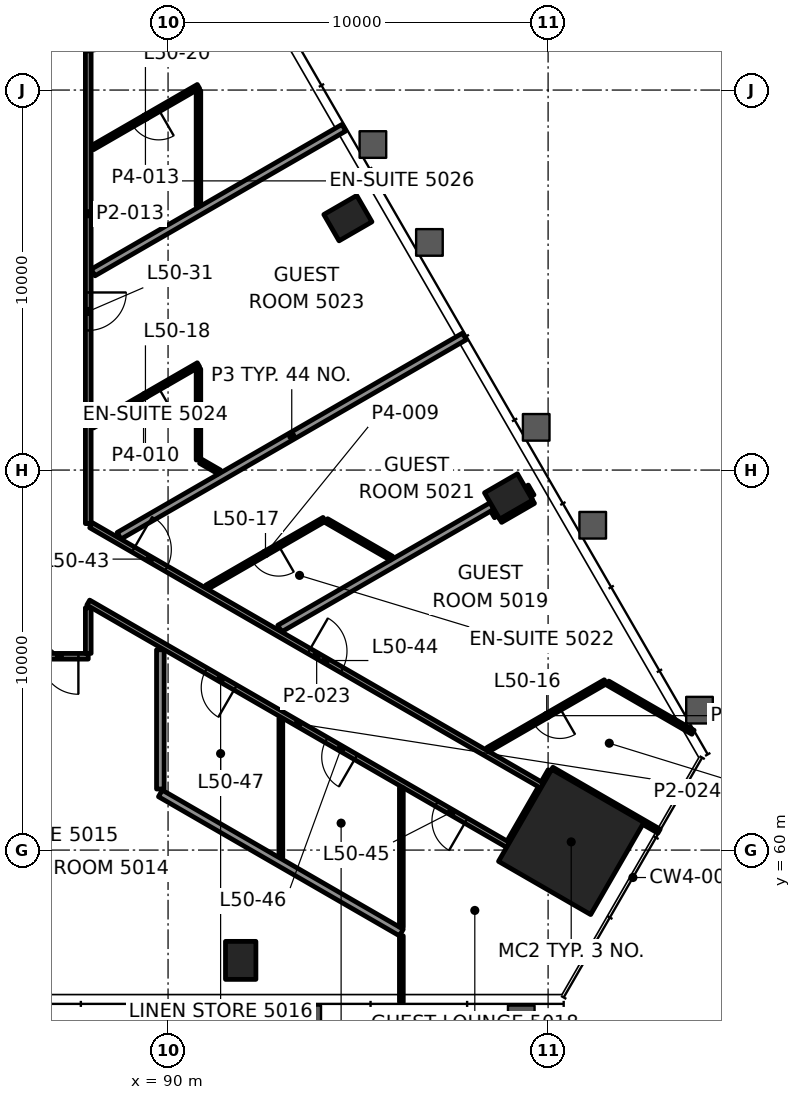
"""IFC4 building model, lengths in metres.
Left out: names, types, materials, properties, quantities, classifications, styles, units other than length and angle.
Written with IfcOpenShell. Run it as: python <this file> out.ifc"""

import sys

from ifc_helpers import new_model, si_unit, direction, frame, frame_2d, origin, origin_2d, place, context, subcontext, project, spatial, rectangle, hollow_rectangle, extrude, element, fill, save


model = new_model("IFC4")
c1 = context("Model", 3, precision=1e-05, world=origin(), true_north=direction((0.0, 1.0)))
c2 = subcontext(c1, "Body", "Model", "MODEL_VIEW")
j1 = project(units=[si_unit("LENGTHUNIT", "METRE"), si_unit("PLANEANGLEUNIT", "RADIAN")], contexts=[c1])
p1 = place(None, origin())
s1 = spatial("IfcSite", under=j1, at=p1, CompositionType="ELEMENT")
p2 = place(p1, origin())
s2 = spatial("IfcBuilding", under=s1, at=p2, CompositionType="ELEMENT")
p3 = place(p2, frame((0.0, 0.0, 214.3)))
s3 = spatial("IfcBuildingStorey", under=s2, at=p3, CompositionType="ELEMENT", Elevation=214.3)
p4 = place(p3, frame((100.608, 60.215, 0.0), z_axis=(0.0, 0.0, 1.0), x_axis=(0.5, 0.866025403784, 0.0)))
e1 = element("IfcColumn", 1, at=p4, inside=s3, PredefinedType="COLUMN", context=c2, shape_type="SweptSolid", body=[
    extrude(rectangle(XDim=2.8, YDim=2.8, at=origin_2d()), origin(), (0.0, 0.0, 1.0), 3.9),
])
for number, where, z_axis, x_axis in (
    (2, (91.911, 57.097, -0.0), (0.0, 0.0, 1.0), (1.0, 0.0, 0.0)),
    (3, (98.96, 69.306, -0.0), (0.0, 0.0, 1.0), (-0.5, 0.866, 0.0)),
    (4, (94.732, 76.628, -0.0), (0.0, 0.0, 1.0), (-0.5, 0.866, 0.0)),
):
    element("IfcColumn", number, at=place(p3, frame(where, z_axis=z_axis, x_axis=x_axis)), inside=s3, PredefinedType="COLUMN", context=c2, shape_type="SweptSolid", body=[
        extrude(hollow_rectangle(XDim=0.8, YDim=1.0, WallThickness=0.05, at=origin_2d()), origin(), (0.0, 0.0, 1.0), 3.9),
    ])
p5 = place(p3, frame((87.899, 65.1, 0.0), z_axis=(0.0, 0.0, 1.0), x_axis=(-1.0, 0.0, 0.0)))
e5 = element("IfcWall", 5, at=p5, inside=s3, PredefinedType="PARTITIONING", context=c2, shape_type="SweptSolid", body=[
    extrude(rectangle(XDim=25.799, YDim=0.15, at=frame_2d((12.899, 0.0))), origin(), (0.0, 0.0, 1.0), 3.1),
])
p6 = place(p5, frame((0.259, 0.0, 0.0)))
e6 = element("IfcOpeningElement", 6, at=p6, cuts=e5, PredefinedType="OPENING", context=c2, shape_type="SweptSolid", body=[
    extrude(rectangle(XDim=1.0, YDim=2.1, at=frame_2d((0.5, 1.05))), frame((0.0, 0.085, 0.0), z_axis=(0.0, -1.0, 0.0), x_axis=(1.0, 0.0, 0.0)), (0.0, 0.0, 1.0), 0.17),
])
p7 = place(p5, frame((4.641, 0.0, 0.0)))
e7 = element("IfcOpeningElement", 7, at=p7, cuts=e5, PredefinedType="OPENING", context=c2, shape_type="SweptSolid", body=[
    extrude(rectangle(XDim=1.0, YDim=2.1, at=frame_2d((0.5, 1.05))), frame((0.0, 0.085, 0.0), z_axis=(0.0, -1.0, 0.0), x_axis=(1.0, 0.0, 0.0)), (0.0, 0.0, 1.0), 0.17),
])
p8 = place(p5, frame((8.868, 0.0, 0.0)))
e8 = element("IfcOpeningElement", 8, at=p8, cuts=e5, PredefinedType="OPENING", context=c2, shape_type="SweptSolid", body=[
    extrude(rectangle(XDim=1.0, YDim=2.1, at=frame_2d((0.5, 1.05))), frame((0.0, 0.085, 0.0), z_axis=(0.0, -1.0, 0.0), x_axis=(1.0, 0.0, 0.0)), (0.0, 0.0, 1.0), 0.17),
])
p9 = place(p5, frame((13.271, 0.0, 0.0)))
e9 = element("IfcOpeningElement", 9, at=p9, cuts=e5, PredefinedType="OPENING", context=c2, shape_type="SweptSolid", body=[
    extrude(rectangle(XDim=1.0, YDim=2.1, at=frame_2d((0.5, 1.05))), frame((0.0, 0.085, 0.0), z_axis=(0.0, -1.0, 0.0), x_axis=(1.0, 0.0, 0.0)), (0.0, 0.0, 1.0), 0.17),
])
p10 = place(p5, frame((19.612, 0.0, 0.0)))
e10 = element("IfcOpeningElement", 10, at=p10, cuts=e5, PredefinedType="OPENING", context=c2, shape_type="SweptSolid", body=[
    extrude(rectangle(XDim=1.0, YDim=2.1, at=frame_2d((0.5, 1.05))), frame((0.0, 0.085, 0.0), z_axis=(0.0, -1.0, 0.0), x_axis=(1.0, 0.0, 0.0)), (0.0, 0.0, 1.0), 0.17),
])
p11 = place(p3, frame((101.509, 64.429, 0.0), z_axis=(0.0, 0.0, 1.0), x_axis=(-0.866028357664, -0.499994883695, 0.0)))
e11 = element("IfcWall", 11, at=p11, inside=s3, PredefinedType="PARTITIONING", context=c2, shape_type="SweptSolid", body=[
    extrude(rectangle(XDim=3.568, YDim=0.12, at=frame_2d((1.784, 0.0))), origin(), (0.0, 0.0, 1.0), 3.1),
])
p12 = place(p11, frame((1.384, 0.0, 0.0)))
e12 = element("IfcOpeningElement", 12, at=p12, cuts=e11, PredefinedType="OPENING", context=c2, shape_type="SweptSolid", body=[
    extrude(rectangle(XDim=0.8, YDim=2.1, at=frame_2d((0.4, 1.05))), frame((0.0, 0.07, 0.0), z_axis=(0.0, -1.0, 0.0), x_axis=(1.0, 0.0, 0.0)), (0.0, 0.0, 1.0), 0.14),
])
p13 = place(p3, frame((98.727, 68.71, 0.0), z_axis=(0.0, 0.0, 1.0), x_axis=(0.866083827272, 0.499898793895, 0.0)))
e13 = element("IfcWall", 13, at=p13, inside=s3, PredefinedType="PARTITIONING", context=c2, shape_type="SweptSolid", body=[
    extrude(rectangle(XDim=0.999, YDim=0.2, at=frame_2d((0.5, 0.0))), origin(), (0.0, 0.0, 1.0), 3.1),
])
p14 = place(p3, frame((92.938, 65.83, 0.0), z_axis=(0.0, 0.0, 1.0), x_axis=(0.866041300655, 0.499972464802, 0.0)))
e14 = element("IfcWall", 14, at=p14, inside=s3, PredefinedType="PARTITIONING", context=c2, shape_type="SweptSolid", body=[
    extrude(rectangle(XDim=6.452, YDim=0.2, at=frame_2d((3.226, 0.0))), origin(), (0.0, 0.0, 1.0), 3.1),
])
p15 = place(p3, frame((94.109, 68.702, 0.0), z_axis=(0.0, 0.0, 1.0), x_axis=(-0.866028357664, -0.499994883695, 0.0)))
e15 = element("IfcWall", 15, at=p15, inside=s3, PredefinedType="PARTITIONING", context=c2, shape_type="SweptSolid", body=[
    extrude(rectangle(XDim=3.568, YDim=0.12, at=frame_2d((1.784, 0.0))), origin(), (0.0, 0.0, 1.0), 3.1),
])
p16 = place(p15, frame((1.384, 0.0, 0.0)))
e16 = element("IfcOpeningElement", 16, at=p16, cuts=e15, PredefinedType="OPENING", context=c2, shape_type="SweptSolid", body=[
    extrude(rectangle(XDim=0.8, YDim=2.1, at=frame_2d((0.4, 1.05))), frame((0.0, 0.07, 0.0), z_axis=(0.0, -1.0, 0.0), x_axis=(1.0, 0.0, 0.0)), (0.0, 0.0, 1.0), 0.14),
])
p17 = place(p3, frame((88.711, 68.27, 0.0), z_axis=(0.0, 0.0, 1.0), x_axis=(0.86602828922, 0.499995002246, 0.0)))
e17 = element("IfcWall", 17, at=p17, inside=s3, PredefinedType="PARTITIONING", context=c2, shape_type="SweptSolid", body=[
    extrude(rectangle(XDim=10.494, YDim=0.2, at=frame_2d((5.247, 0.0))), origin(), (0.0, 0.0, 1.0), 3.022),
])
p18 = place(p3, frame((90.8, 72.771, 0.0), z_axis=(0.0, 0.0, 1.0), x_axis=(-0.86604299788, -0.499969524894, 0.0)))
e18 = element("IfcWall", 18, at=p18, inside=s3, PredefinedType="PARTITIONING", context=c2, shape_type="SweptSolid", body=[
    extrude(rectangle(XDim=3.222, YDim=0.12, at=frame_2d((1.611, 0.0))), origin(), (0.0, 0.0, 1.0), 3.1),
])
p19 = place(p18, frame((1.211, 0.0, 0.0)))
e19 = element("IfcOpeningElement", 19, at=p19, cuts=e18, PredefinedType="OPENING", context=c2, shape_type="SweptSolid", body=[
    extrude(rectangle(XDim=0.8, YDim=2.1, at=frame_2d((0.4, 1.05))), frame((0.0, 0.07, 0.0), z_axis=(0.0, -1.0, 0.0), x_axis=(1.0, 0.0, 0.0)), (0.0, 0.0, 1.0), 0.14),
])
p20 = place(p3, frame((88.027, 75.198, 0.0), z_axis=(0.0, 0.0, 1.0), x_axis=(0.866028758719, 0.499994189038, 0.0)))
e20 = element("IfcWall", 20, at=p20, inside=s3, PredefinedType="PARTITIONING", context=c2, shape_type="SweptSolid", body=[
    extrude(rectangle(XDim=7.622, YDim=0.2, at=frame_2d((3.811, 0.0))), origin(), (0.0, 0.0, 1.0), 3.022),
])
p21 = place(p3, frame((90.8, 80.095, 0.0), z_axis=(0.0, 0.0, 1.0), x_axis=(-0.866029130051, -0.499993545862, 0.0)))
e21 = element("IfcWall", 21, at=p21, inside=s3, PredefinedType="PARTITIONING", context=c2, shape_type="SweptSolid", body=[
    extrude(rectangle(XDim=3.222, YDim=0.12, at=frame_2d((1.611, 0.0))), origin(), (0.0, 0.0, 1.0), 3.1),
])
p22 = place(p21, frame((1.211, 0.0, 0.0)))
e22 = element("IfcOpeningElement", 22, at=p22, cuts=e21, PredefinedType="OPENING", context=c2, shape_type="SweptSolid", body=[
    extrude(rectangle(XDim=0.8, YDim=2.1, at=frame_2d((0.4, 1.05))), frame((0.0, 0.07, 0.0), z_axis=(0.0, -1.0, 0.0), x_axis=(1.0, 0.0, 0.0)), (0.0, 0.0, 1.0), 0.14),
])
p23 = place(p3, frame((98.984, 60.201, 0.0), z_axis=(0.0, 0.0, 1.0), x_axis=(0.499991515992, 0.866030301974, 0.0)))
e23 = element("IfcWall", 23, at=p23, inside=s3, PredefinedType="PARTITIONING", context=c2, shape_type="SweptSolid", body=[
    extrude(rectangle(XDim=1.649, YDim=0.15, at=frame_2d((0.825, 0.0))), origin(), (0.0, 0.0, 1.0), 2.947),
])
p24 = place(p3, frame((96.139, 55.998, 0.0), z_axis=(0.0, 0.0, 1.0), x_axis=(0.0, 1.0, 0.0)))
e24 = element("IfcWall", 24, at=p24, inside=s3, PredefinedType="PARTITIONING", context=c2, shape_type="SweptSolid", body=[
    extrude(rectangle(XDim=1.746, YDim=0.1, at=frame_2d((0.873, 0.0))), origin(), (0.0, 0.0, 1.0), 3.1),
])
p25 = place(p3, frame((92.968, 59.806, 0.0), z_axis=(0.0, 0.0, 1.0), x_axis=(0.0, 1.0, 0.0)))
e25 = element("IfcWall", 25, at=p25, inside=s3, PredefinedType="PARTITIONING", context=c2, shape_type="SweptSolid", body=[
    extrude(rectangle(XDim=3.664, YDim=0.1, at=frame_2d((1.832, 0.0))), origin(), (0.0, 0.0, 1.0), 3.1),
])
p26 = place(p3, frame((90.8, 70.266, 0.0), z_axis=(0.0, 0.0, 1.0), x_axis=(0.0, 1.0, 0.0)))
e26 = element("IfcWall", 26, at=p26, inside=s3, PredefinedType="PARTITIONING", context=c2, shape_type="SweptSolid", body=[
    extrude(rectangle(XDim=2.397, YDim=0.12, at=frame_2d((1.198, 0.0))), origin(), (0.0, 0.0, 1.0), 3.1),
])
p27 = place(p3, frame((90.8, 76.955, 0.0), z_axis=(0.0, 0.0, 1.0), x_axis=(0.0, 1.0, 0.0)))
e27 = element("IfcWall", 27, at=p27, inside=s3, PredefinedType="PARTITIONING", context=c2, shape_type="SweptSolid", body=[
    extrude(rectangle(XDim=3.031, YDim=0.12, at=frame_2d((1.515, 0.0))), origin(), (0.0, 0.0, 1.0), 3.1),
])
p28 = place(p3, frame((89.797, 61.607, 0.0), z_axis=(0.0, 0.0, 1.0), x_axis=(0.0, 1.0, 0.0)))
e28 = element("IfcWall", 28, at=p28, inside=s3, PredefinedType="PARTITIONING", context=c2, shape_type="SweptSolid", body=[
    extrude(rectangle(XDim=3.664, YDim=0.2, at=frame_2d((1.832, 0.0))), origin(), (0.0, 0.0, 1.0), 2.947),
])
p29 = place(p3, frame((87.9, 65.176, 0.0), z_axis=(0.0, 0.0, 1.0), x_axis=(0.0, 1.0, 0.0)))
e29 = element("IfcWall", 29, at=p29, inside=s3, PredefinedType="PARTITIONING", context=c2, shape_type="SweptSolid", body=[
    extrude(rectangle(XDim=1.201, YDim=0.15, at=frame_2d((0.6, 0.0))), origin(), (0.0, 0.0, 1.0), 2.947),
])
p30 = place(p3, frame((87.9, 84.9, 0.0), z_axis=(0.0, 0.0, 1.0), x_axis=(0.0, -1.0, 0.0)))
e30 = element("IfcWall", 30, at=p30, inside=s3, PredefinedType="PARTITIONING", context=c2, shape_type="SweptSolid", body=[
    extrude(rectangle(XDim=16.309, YDim=0.15, at=frame_2d((8.154, 0.0))), origin(), (0.0, 0.0, 1.0), 3.1),
])
p31 = place(p30, frame((2.904, 0.0, 0.0)))
e31 = element("IfcOpeningElement", 31, at=p31, cuts=e30, PredefinedType="OPENING", context=c2, shape_type="SweptSolid", body=[
    extrude(rectangle(XDim=1.0, YDim=2.1, at=frame_2d((0.5, 1.05))), frame((0.0, 0.085, 0.0), z_axis=(0.0, -1.0, 0.0), x_axis=(1.0, 0.0, 0.0)), (0.0, 0.0, 1.0), 0.17),
])
p32 = place(p30, frame((10.227, 0.0, 0.0)))
e32 = element("IfcOpeningElement", 32, at=p32, cuts=e30, PredefinedType="OPENING", context=c2, shape_type="SweptSolid", body=[
    extrude(rectangle(XDim=1.0, YDim=2.1, at=frame_2d((0.5, 1.05))), frame((0.0, 0.085, 0.0), z_axis=(0.0, -1.0, 0.0), x_axis=(1.0, 0.0, 0.0)), (0.0, 0.0, 1.0), 0.17),
])
p33 = place(p3, frame((99.542, 69.296, 0.0), z_axis=(0.0, 0.0, 1.0), x_axis=(-0.500005339912, 0.866022320763, 0.0)))
e33 = element("IfcWall", 33, at=p33, inside=s3, PredefinedType="PARTITIONING", context=c2, shape_type="SweptSolid", body=[
    extrude(rectangle(XDim=0.299, YDim=0.2, at=frame_2d((0.149, 0.0))), origin(), (0.0, 0.0, 1.0), 3.1),
])
p34 = place(p3, frame((98.676, 68.796, 0.0), z_axis=(0.0, 0.0, 1.0), x_axis=(-0.4999705729, 0.866042392862, 0.0)))
e34 = element("IfcWall", 34, at=p34, inside=s3, PredefinedType="PARTITIONING", context=c2, shape_type="SweptSolid", body=[
    extrude(rectangle(XDim=0.199, YDim=0.2, at=frame_2d((0.099, 0.0))), origin(), (0.0, 0.0, 1.0), 3.1),
])
p35 = place(p3, frame((103.813, 63.099, 0.0), z_axis=(0.0, 0.0, 1.0), x_axis=(-0.866025553686, 0.499999740363, 0.0)))
e35 = element("IfcWall", 35, at=p35, inside=s3, PredefinedType="PARTITIONING", context=c2, shape_type="SweptSolid", body=[
    extrude(rectangle(XDim=2.591, YDim=0.12, at=frame_2d((1.296, 0.0))), origin(), (0.0, 0.0, 1.0), 3.1),
])
p36 = place(p3, frame((95.877, 67.681, 0.0), z_axis=(0.0, 0.0, 1.0), x_axis=(-0.866002090371, 0.500040377843, 0.0)))
e36 = element("IfcWall", 36, at=p36, inside=s3, PredefinedType="PARTITIONING", context=c2, shape_type="SweptSolid", body=[
    extrude(rectangle(XDim=1.972, YDim=0.12, at=frame_2d((0.986, 0.0))), origin(), (0.0, 0.0, 1.0), 3.1),
])
p37 = place(p3, frame((91.349, 69.949, 0.0), z_axis=(0.0, 0.0, 1.0), x_axis=(-0.865998287773, 0.500046963369, 0.0)))
e37 = element("IfcWall", 37, at=p37, inside=s3, PredefinedType="PARTITIONING", context=c2, shape_type="SweptSolid", body=[
    extrude(rectangle(XDim=0.564, YDim=0.12, at=frame_2d((0.282, 0.0))), origin(), (0.0, 0.0, 1.0), 3.1),
])
p38 = place(p3, frame((102.919, 60.498, 0.0), z_axis=(0.0, 0.0, 1.0), x_axis=(-0.866003472149, 0.500037984783, 0.0)))
e38 = element("IfcWall", 38, at=p38, inside=s3, PredefinedType="PARTITIONING", context=c2, shape_type="SweptSolid", body=[
    extrude(rectangle(XDim=3.26, YDim=0.12, at=frame_2d((1.63, 0.0))), origin(), (0.0, 0.0, 1.0), 3.1),
])
p39 = place(p3, frame((87.975, 68.548, 0.0), z_axis=(0.0, 0.0, 1.0), x_axis=(0.866024823711, -0.500001004715, 0.0)))
e39 = element("IfcWall", 39, at=p39, inside=s3, PredefinedType="PARTITIONING", context=c2, shape_type="SweptSolid", body=[
    extrude(rectangle(XDim=13.707, YDim=0.15, at=frame_2d((6.854, 0.0))), origin(), (0.0, 0.0, 1.0), 3.1),
])
p40 = place(p39, frame((1.283, 0.0, 0.0)))
e40 = element("IfcOpeningElement", 40, at=p40, cuts=e39, PredefinedType="OPENING", context=c2, shape_type="SweptSolid", body=[
    extrude(rectangle(XDim=1.0, YDim=2.1, at=frame_2d((0.5, 1.05))), frame((0.0, 0.085, 0.0), z_axis=(0.0, -1.0, 0.0), x_axis=(1.0, 0.0, 0.0)), (0.0, 0.0, 1.0), 0.17),
])
p41 = place(p39, frame((6.62, 0.0, 0.0)))
e41 = element("IfcOpeningElement", 41, at=p41, cuts=e39, PredefinedType="OPENING", context=c2, shape_type="SweptSolid", body=[
    extrude(rectangle(XDim=1.0, YDim=2.1, at=frame_2d((0.5, 1.05))), frame((0.0, 0.085, 0.0), z_axis=(0.0, -1.0, 0.0), x_axis=(1.0, 0.0, 0.0)), (0.0, 0.0, 1.0), 0.17),
])
p42 = place(p3, frame((98.945, 60.136, 0.0), z_axis=(0.0, 0.0, 1.0), x_axis=(-0.866024604137, 0.500001385028, 0.0)))
e42 = element("IfcWall", 42, at=p42, inside=s3, PredefinedType="PARTITIONING", context=c2, shape_type="SweptSolid", body=[
    extrude(rectangle(XDim=12.754, YDim=0.15, at=frame_2d((6.377, 0.0))), origin(), (0.0, 0.0, 1.0), 2.947),
])
p43 = place(p42, frame((1.271, 0.0, 0.0)))
e43 = element("IfcOpeningElement", 43, at=p43, cuts=e42, PredefinedType="OPENING", context=c2, shape_type="SweptSolid", body=[
    extrude(rectangle(XDim=0.9, YDim=2.1, at=frame_2d((0.45, 1.05))), frame((0.0, 0.085, 0.0), z_axis=(0.0, -1.0, 0.0), x_axis=(1.0, 0.0, 0.0)), (0.0, 0.0, 1.0), 0.17),
])
p44 = place(p42, frame((4.621, 0.0, 0.0)))
e44 = element("IfcOpeningElement", 44, at=p44, cuts=e42, PredefinedType="OPENING", context=c2, shape_type="SweptSolid", body=[
    extrude(rectangle(XDim=0.9, YDim=2.1, at=frame_2d((0.45, 1.05))), frame((0.0, 0.085, 0.0), z_axis=(0.0, -1.0, 0.0), x_axis=(1.0, 0.0, 0.0)), (0.0, 0.0, 1.0), 0.17),
])
p45 = place(p42, frame((8.282, 0.0, 0.0)))
e45 = element("IfcOpeningElement", 45, at=p45, cuts=e42, PredefinedType="OPENING", context=c2, shape_type="SweptSolid", body=[
    extrude(rectangle(XDim=0.9, YDim=2.1, at=frame_2d((0.45, 1.05))), frame((0.0, 0.085, 0.0), z_axis=(0.0, -1.0, 0.0), x_axis=(1.0, 0.0, 0.0)), (0.0, 0.0, 1.0), 0.17),
])
p46 = place(p3, frame((96.139, 57.83, 0.0), z_axis=(0.0, 0.0, 1.0), x_axis=(-0.866014584968, 0.500018738272, 0.0)))
e46 = element("IfcWall", 46, at=p46, inside=s3, PredefinedType="PARTITIONING", context=c2, shape_type="SweptSolid", body=[
    extrude(rectangle(XDim=7.323, YDim=0.2, at=frame_2d((3.662, 0.0))), origin(), (0.0, 0.0, 1.0), 3.1),
])
p47 = place(p3, frame((99.884, 61.76, 0.0), z_axis=(0.0, 0.0, 1.0), x_axis=(0.500031897912, 0.866006986733, 0.0)))
e47 = element("IfcWall", 47, at=p47, inside=s3, PredefinedType="PARTITIONING", context=c2, shape_type="SweptSolid", body=[
    extrude(rectangle(XDim=0.364, YDim=0.15, at=frame_2d((0.182, 0.0))), origin(), (0.0, 0.0, 1.0), 3.1),
])
p48 = place(p3, frame((96.139, 57.975, 0.0), z_axis=(0.0, 0.0, 1.0), x_axis=(0.0, 1.0, 0.0)))
e48 = element("IfcWall", 48, at=p48, inside=s3, PredefinedType="PARTITIONING", context=c2, shape_type="SweptSolid", body=[
    extrude(rectangle(XDim=3.665, YDim=0.1, at=frame_2d((1.833, 0.0))), origin(), (0.0, 0.0, 1.0), 3.1),
])
p49 = place(p6, origin())
e49 = element("IfcDoor", 49, at=p49, inside=s3, OperationType="SINGLE_SWING_RIGHT", PredefinedType="DOOR", context=c2, shape_type="SweptSolid", body=[
    extrude(rectangle(XDim=1.0, YDim=2.1, at=frame_2d((0.5, 1.05))), frame((0.0, 0.025, 0.0), z_axis=(0.0, -1.0, 0.0), x_axis=(1.0, 0.0, 0.0)), (0.0, 0.0, 1.0), 0.05),
])
fill(e6, e49)
p50 = place(p12, origin())
e50 = element("IfcDoor", 50, at=p50, inside=s3, OperationType="SINGLE_SWING_RIGHT", PredefinedType="DOOR", context=c2, shape_type="SweptSolid", body=[
    extrude(rectangle(XDim=0.8, YDim=2.1, at=frame_2d((0.4, 1.05))), frame((0.0, 0.025, 0.0), z_axis=(0.0, -1.0, 0.0), x_axis=(1.0, 0.0, 0.0)), (0.0, 0.0, 1.0), 0.05),
])
fill(e12, e50)
p51 = place(p16, origin())
e51 = element("IfcDoor", 51, at=p51, inside=s3, OperationType="SINGLE_SWING_RIGHT", PredefinedType="DOOR", context=c2, shape_type="SweptSolid", body=[
    extrude(rectangle(XDim=0.8, YDim=2.1, at=frame_2d((0.4, 1.05))), frame((0.0, 0.025, 0.0), z_axis=(0.0, -1.0, 0.0), x_axis=(1.0, 0.0, 0.0)), (0.0, 0.0, 1.0), 0.05),
])
fill(e16, e51)
p52 = place(p19, origin())
e52 = element("IfcDoor", 52, at=p52, inside=s3, OperationType="SINGLE_SWING_RIGHT", PredefinedType="DOOR", context=c2, shape_type="SweptSolid", body=[
    extrude(rectangle(XDim=0.8, YDim=2.1, at=frame_2d((0.4, 1.05))), frame((0.0, 0.025, 0.0), z_axis=(0.0, -1.0, 0.0), x_axis=(1.0, 0.0, 0.0)), (0.0, 0.0, 1.0), 0.05),
])
fill(e19, e52)
p53 = place(p22, origin())
e53 = element("IfcDoor", 53, at=p53, inside=s3, OperationType="SINGLE_SWING_RIGHT", PredefinedType="DOOR", context=c2, shape_type="SweptSolid", body=[
    extrude(rectangle(XDim=0.8, YDim=2.1, at=frame_2d((0.4, 1.05))), frame((0.0, 0.025, 0.0), z_axis=(0.0, -1.0, 0.0), x_axis=(1.0, 0.0, 0.0)), (0.0, 0.0, 1.0), 0.05),
])
fill(e22, e53)
p54 = place(p31, origin())
e54 = element("IfcDoor", 54, at=p54, inside=s3, OperationType="SINGLE_SWING_LEFT", PredefinedType="DOOR", context=c2, shape_type="SweptSolid", body=[
    extrude(rectangle(XDim=1.0, YDim=2.1, at=frame_2d((0.5, 1.05))), frame((0.0, 0.025, 0.0), z_axis=(0.0, -1.0, 0.0), x_axis=(1.0, 0.0, 0.0)), (0.0, 0.0, 1.0), 0.05),
])
fill(e31, e54)
p55 = place(p32, origin())
e55 = element("IfcDoor", 55, at=p55, inside=s3, OperationType="SINGLE_SWING_LEFT", PredefinedType="DOOR", context=c2, shape_type="SweptSolid", body=[
    extrude(rectangle(XDim=1.0, YDim=2.1, at=frame_2d((0.5, 1.05))), frame((0.0, 0.025, 0.0), z_axis=(0.0, -1.0, 0.0), x_axis=(1.0, 0.0, 0.0)), (0.0, 0.0, 1.0), 0.05),
])
fill(e32, e55)
p56 = place(p40, origin())
e56 = element("IfcDoor", 56, at=p56, inside=s3, OperationType="SINGLE_SWING_LEFT", PredefinedType="DOOR", context=c2, shape_type="SweptSolid", body=[
    extrude(rectangle(XDim=1.0, YDim=2.1, at=frame_2d((0.5, 1.05))), frame((0.0, 0.025, 0.0), z_axis=(0.0, -1.0, 0.0), x_axis=(1.0, 0.0, 0.0)), (0.0, 0.0, 1.0), 0.05),
])
fill(e40, e56)
p57 = place(p41, origin())
e57 = element("IfcDoor", 57, at=p57, inside=s3, OperationType="SINGLE_SWING_LEFT", PredefinedType="DOOR", context=c2, shape_type="SweptSolid", body=[
    extrude(rectangle(XDim=1.0, YDim=2.1, at=frame_2d((0.5, 1.05))), frame((0.0, 0.025, 0.0), z_axis=(0.0, -1.0, 0.0), x_axis=(1.0, 0.0, 0.0)), (0.0, 0.0, 1.0), 0.05),
])
fill(e41, e57)
p58 = place(p43, origin())
e58 = element("IfcDoor", 58, at=p58, inside=s3, OperationType="SINGLE_SWING_LEFT", PredefinedType="DOOR", context=c2, shape_type="SweptSolid", body=[
    extrude(rectangle(XDim=0.9, YDim=2.1, at=frame_2d((0.45, 1.05))), frame((0.0, 0.025, 0.0), z_axis=(0.0, -1.0, 0.0), x_axis=(1.0, 0.0, 0.0)), (0.0, 0.0, 1.0), 0.05),
])
fill(e43, e58)
p59 = place(p44, origin())
e59 = element("IfcDoor", 59, at=p59, inside=s3, OperationType="SINGLE_SWING_RIGHT", PredefinedType="DOOR", context=c2, shape_type="SweptSolid", body=[
    extrude(rectangle(XDim=0.9, YDim=2.1, at=frame_2d((0.45, 1.05))), frame((0.0, 0.025, 0.0), z_axis=(0.0, -1.0, 0.0), x_axis=(1.0, 0.0, 0.0)), (0.0, 0.0, 1.0), 0.05),
])
fill(e44, e59)
p60 = place(p45, origin())
e60 = element("IfcDoor", 60, at=p60, inside=s3, OperationType="SINGLE_SWING_LEFT", PredefinedType="DOOR", context=c2, shape_type="SweptSolid", body=[
    extrude(rectangle(XDim=0.9, YDim=2.1, at=frame_2d((0.45, 1.05))), frame((0.0, 0.025, 0.0), z_axis=(0.0, -1.0, 0.0), x_axis=(1.0, 0.0, 0.0)), (0.0, 0.0, 1.0), 0.05),
])
fill(e45, e60)
p61 = place(p3, origin())
p62 = place(p61, frame((86.333, 55.952, 0.15), z_axis=(0.0, 0.0, 1.0), x_axis=(1.0, 0.0, 0.0)))
p63 = place(p62, origin())
e61 = element("IfcWindow", 61, at=p63, inside=s3, PartitioningType="SINGLE_PANEL", PredefinedType="WINDOW", context=c2, shape_type="SweptSolid", body=[
    extrude(rectangle(XDim=2.743, YDim=3.55, at=frame_2d((1.372, 1.775))), frame((0.0, 0.03, 0.0), z_axis=(0.0, -1.0, 0.0), x_axis=(1.0, 0.0, 0.0)), (0.0, 0.0, 1.0), 0.06),
])
p64 = place(p61, frame((102.769, 64.998, 0.15), z_axis=(0.0, 0.0, 1.0), x_axis=(-0.5, 0.866025, 0.0)))
p65 = place(p64, origin())
e62 = element("IfcWindow", 62, at=p65, inside=s3, PartitioningType="SINGLE_PANEL", PredefinedType="WINDOW", context=c2, shape_type="SweptSolid", body=[
    extrude(rectangle(XDim=2.743, YDim=3.55, at=frame_2d((1.372, 1.775))), frame((0.0, 0.03, 0.0), z_axis=(0.0, -1.0, 0.0), x_axis=(1.0, 0.0, 0.0)), (0.0, 0.0, 1.0), 0.06),
])
save(model, sys.argv[1])
